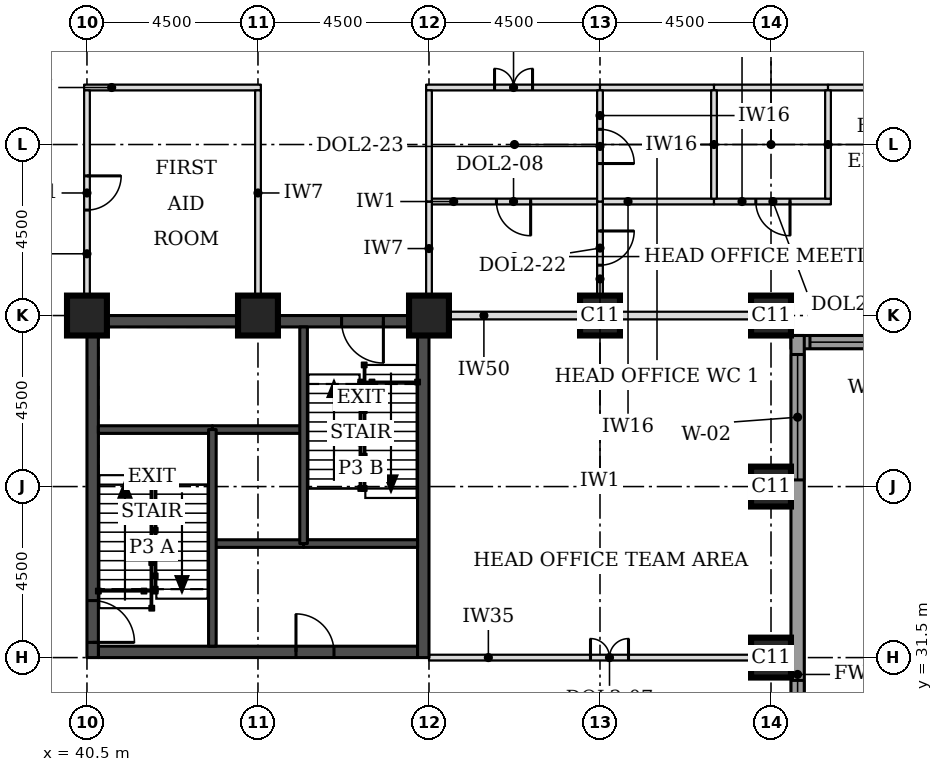
"""IFC4 building model, lengths in metres.
Left out: names, types, materials, properties, quantities, classifications, styles, units other than length and angle.
Written with IfcOpenShell. Run it as: python <this file> out.ifc"""

import sys

from ifc_helpers import new_model, si_unit, direction, frame, frame_2d, origin, origin_2d, place, context, subcontext, project, spatial, rectangle, extrude, element, fill, save


model = new_model("IFC4")
c1 = context("Model", 3, precision=1e-05, world=origin(), true_north=direction((0.0, 1.0)))
c2 = subcontext(c1, "Body", "Model", "MODEL_VIEW")
j1 = project(units=[si_unit("LENGTHUNIT", "METRE"), si_unit("PLANEANGLEUNIT", "RADIAN")], contexts=[c1])
p1 = place(None, origin())
s1 = spatial("IfcSite", under=j1, at=p1, CompositionType="ELEMENT")
p2 = place(p1, origin())
s2 = spatial("IfcBuilding", under=s1, at=p2, CompositionType="ELEMENT")
p3 = place(p2, frame((0.0, 0.0, 86.3)))
s3 = spatial("IfcBuildingStorey", under=s2, at=p3, CompositionType="ELEMENT", Elevation=86.3)
for number, where, z_axis, x_axis in (
    (1, (58.5, 31.5, 0.0), (0.0, 0.0, 1.0), (1.0, 0.0, 0.0)),
    (2, (58.5, 36.0, 0.0), (0.0, 0.0, 1.0), (1.0, 0.0, 0.0)),
    (3, (40.5, 40.5, 0.0), (0.0, 0.0, 1.0), (1.0, 0.0, 0.0)),
    (4, (45.0, 40.5, 0.0), (0.0, 0.0, 1.0), (1.0, 0.0, 0.0)),
    (5, (49.5, 40.5, 0.0), (0.0, 0.0, 1.0), (1.0, 0.0, 0.0)),
    (6, (54.0, 40.5, 0.0), (0.0, 0.0, 1.0), (1.0, 0.0, 0.0)),
    (7, (58.5, 40.5, 0.0), (0.0, 0.0, 1.0), (1.0, 0.0, 0.0)),
):
    element("IfcColumn", number, at=place(p3, frame(where, z_axis=z_axis, x_axis=x_axis)), inside=s3, PredefinedType="COLUMN", context=c2, shape_type="SweptSolid", body=[
        extrude(rectangle(XDim=1.05, YDim=1.05, at=origin_2d()), origin(), (0.0, 0.0, 1.0), 3.7),
    ])
p4 = place(p3, frame((40.8, 31.65, 0.0), z_axis=(0.0, 0.0, 1.0), x_axis=(1.0, 0.0, 0.0)))
e8 = element("IfcWall", 8, at=p4, inside=s3, PredefinedType="SHEAR", context=c2, shape_type="SweptSolid", body=[
    extrude(rectangle(XDim=8.4, YDim=0.3, at=frame_2d((4.2, 0.0))), origin(), (0.0, 0.0, 1.0), 3.7),
])
p5 = place(p4, frame((5.2, 0.0, 0.0)))
e9 = element("IfcOpeningElement", 9, at=p5, cuts=e8, PredefinedType="OPENING", context=c2, shape_type="SweptSolid", body=[
    extrude(rectangle(XDim=1.0, YDim=2.1, at=frame_2d((0.5, 1.05))), frame((0.0, 0.16, 0.0), z_axis=(0.0, -1.0, 0.0), x_axis=(1.0, 0.0, 0.0)), (0.0, 0.0, 1.0), 0.32),
])
p6 = place(p3, frame((40.8, 40.35, 0.0), z_axis=(0.0, 0.0, 1.0), x_axis=(1.0, 0.0, 0.0)))
e10 = element("IfcWall", 10, at=p6, inside=s3, PredefinedType="SHEAR", context=c2, shape_type="SweptSolid", body=[
    extrude(rectangle(XDim=8.4, YDim=0.3, at=frame_2d((4.2, 0.0))), origin(), (0.0, 0.0, 1.0), 3.7),
])
p7 = place(p6, frame((6.4, 0.0, 0.0)))
e11 = element("IfcOpeningElement", 11, at=p7, cuts=e10, PredefinedType="OPENING", context=c2, shape_type="SweptSolid", body=[
    extrude(rectangle(XDim=1.1, YDim=2.1, at=frame_2d((0.55, 1.05))), frame((0.0, 0.16, 0.0), z_axis=(0.0, -1.0, 0.0), x_axis=(1.0, 0.0, 0.0)), (0.0, 0.0, 1.0), 0.32),
])
p8 = place(p3, frame((40.65, 31.5, 0.0), z_axis=(0.0, 0.0, 1.0), x_axis=(0.0, 1.0, 0.0)))
e12 = element("IfcWall", 12, at=p8, inside=s3, PredefinedType="SHEAR", context=c2, shape_type="SweptSolid", body=[
    extrude(rectangle(XDim=9.0, YDim=0.3, at=frame_2d((4.5, 0.0))), origin(), (0.0, 0.0, 1.0), 3.7),
])
p9 = place(p8, frame((0.4, 0.0, 0.0)))
e13 = element("IfcOpeningElement", 13, at=p9, cuts=e12, PredefinedType="OPENING", context=c2, shape_type="SweptSolid", body=[
    extrude(rectangle(XDim=1.1, YDim=2.1, at=frame_2d((0.55, 1.05))), frame((0.0, 0.16, 0.0), z_axis=(0.0, -1.0, 0.0), x_axis=(1.0, 0.0, 0.0)), (0.0, 0.0, 1.0), 0.32),
])
p10 = place(p3, frame((49.35, 31.5, 0.0), z_axis=(0.0, 0.0, 1.0), x_axis=(0.0, 1.0, 0.0)))
e14 = element("IfcWall", 14, at=p10, inside=s3, PredefinedType="SHEAR", context=c2, shape_type="SweptSolid", body=[
    extrude(rectangle(XDim=9.0, YDim=0.3, at=frame_2d((4.5, 0.0))), origin(), (0.0, 0.0, 1.0), 3.7),
])
p11 = place(p3, frame((59.025, 39.8, 0.0), z_axis=(0.0, 0.0, 1.0), x_axis=(1.0, 0.0, 0.0)))
e15 = element("IfcWall", 15, at=p11, inside=s3, PredefinedType="STANDARD", context=c2, shape_type="SweptSolid", body=[
    extrude(rectangle(XDim=13.337, YDim=0.35, at=frame_2d((6.669, 0.0))), origin(), (0.0, 0.0, 1.0), 3.525),
])
p12 = place(p11, frame((0.5, 0.0, 0.9)))
e16 = element("IfcOpeningElement", 16, at=p12, cuts=e15, PredefinedType="OPENING", context=c2, shape_type="SweptSolid", body=[
    extrude(rectangle(XDim=3.3, YDim=1.9, at=frame_2d((1.65, 0.95))), frame((0.0, 0.185, 0.0), z_axis=(0.0, -1.0, 0.0), x_axis=(1.0, 0.0, 0.0)), (0.0, 0.0, 1.0), 0.37),
])
p13 = place(p3, frame((59.2, 22.138, 0.0), z_axis=(0.0, 0.0, 1.0), x_axis=(0.0, 1.0, 0.0)))
e17 = element("IfcWall", 17, at=p13, inside=s3, PredefinedType="STANDARD", context=c2, shape_type="SweptSolid", body=[
    extrude(rectangle(XDim=17.837, YDim=0.35, at=frame_2d((8.919, 0.0))), origin(), (0.0, 0.0, 1.0), 3.525),
])
p14 = place(p13, frame((5.462, 0.0, 0.9)))
e18 = element("IfcOpeningElement", 18, at=p14, cuts=e17, PredefinedType="OPENING", context=c2, shape_type="SweptSolid", body=[
    extrude(rectangle(XDim=3.3, YDim=1.9, at=frame_2d((1.65, 0.95))), frame((0.0, 0.185, 0.0), z_axis=(0.0, -1.0, 0.0), x_axis=(1.0, 0.0, 0.0)), (0.0, 0.0, 1.0), 0.37),
])
p15 = place(p13, frame((14.037, 0.0, 0.9)))
e19 = element("IfcOpeningElement", 19, at=p15, cuts=e17, PredefinedType="OPENING", context=c2, shape_type="SweptSolid", body=[
    extrude(rectangle(XDim=3.3, YDim=1.9, at=frame_2d((1.65, 0.95))), frame((0.0, 0.185, 0.0), z_axis=(0.0, -1.0, 0.0), x_axis=(1.0, 0.0, 0.0)), (0.0, 0.0, 1.0), 0.37),
])
p16 = place(p3, frame((49.5, 31.5, 0.0), z_axis=(0.0, 0.0, 1.0), x_axis=(1.0, 0.0, 0.0)))
e20 = element("IfcWall", 20, at=p16, inside=s3, PredefinedType="PARTITIONING", context=c2, shape_type="SweptSolid", body=[
    extrude(rectangle(XDim=9.525, YDim=0.15, at=frame_2d((4.762, 0.0))), origin(), (0.0, 0.0, 1.0), 2.55),
])
p17 = place(p16, frame((4.25, 0.0, 0.0)))
e21 = element("IfcOpeningElement", 21, at=p17, cuts=e20, PredefinedType="OPENING", context=c2, shape_type="SweptSolid", body=[
    extrude(rectangle(XDim=1.0, YDim=2.1, at=frame_2d((0.5, 1.05))), frame((0.0, 0.085, 0.0), z_axis=(0.0, -1.0, 0.0), x_axis=(1.0, 0.0, 0.0)), (0.0, 0.0, 1.0), 0.17),
])
p18 = place(p3, frame((50.015, 40.5, 0.0), z_axis=(0.0, 0.0, 1.0), x_axis=(1.0, 0.0, 0.0)))
e22 = element("IfcWall", 22, at=p18, inside=s3, PredefinedType="PARTITIONING", context=c2, shape_type="SweptSolid", body=[
    extrude(rectangle(XDim=3.46, YDim=0.2, at=frame_2d((1.73, 0.0))), origin(), (0.0, 0.0, 1.0), 2.8),
])
p19 = place(p3, frame((54.495, 40.5, 0.0), z_axis=(0.0, 0.0, 1.0), x_axis=(1.0, 0.0, 0.0)))
e23 = element("IfcWall", 23, at=p19, inside=s3, PredefinedType="PARTITIONING", context=c2, shape_type="SweptSolid", body=[
    extrude(rectangle(XDim=3.48, YDim=0.2, at=frame_2d((1.74, 0.0))), origin(), (0.0, 0.0, 1.0), 2.8),
])
p20 = place(p3, frame((49.575, 43.5, 0.0), z_axis=(0.0, 0.0, 1.0), x_axis=(1.0, 0.0, 0.0)))
e24 = element("IfcWall", 24, at=p20, inside=s3, PredefinedType="PARTITIONING", context=c2, shape_type="SweptSolid", body=[
    extrude(rectangle(XDim=4.35, YDim=0.15, at=frame_2d((2.175, 0.0))), origin(), (0.0, 0.0, 1.0), 3.55),
])
p21 = place(p20, frame((1.7, 0.0, 0.0)))
e25 = element("IfcOpeningElement", 25, at=p21, cuts=e24, PredefinedType="OPENING", context=c2, shape_type="SweptSolid", body=[
    extrude(rectangle(XDim=0.9, YDim=2.1, at=frame_2d((0.45, 1.05))), frame((0.0, 0.085, 0.0), z_axis=(0.0, -1.0, 0.0), x_axis=(1.0, 0.0, 0.0)), (0.0, 0.0, 1.0), 0.17),
])
p22 = place(p3, frame((54.075, 43.5, 0.0), z_axis=(0.0, 0.0, 1.0), x_axis=(1.0, 0.0, 0.0)))
e26 = element("IfcWall", 26, at=p22, inside=s3, PredefinedType="PARTITIONING", context=c2, shape_type="SweptSolid", body=[
    extrude(rectangle(XDim=2.925, YDim=0.15, at=frame_2d((1.462, 0.0))), origin(), (0.0, 0.0, 1.0), 3.55),
])
p23 = place(p3, frame((57.0, 43.5, 0.0), z_axis=(0.0, 0.0, 1.0), x_axis=(1.0, 0.0, 0.0)))
e27 = element("IfcWall", 27, at=p23, inside=s3, PredefinedType="PARTITIONING", context=c2, shape_type="SweptSolid", body=[
    extrude(rectangle(XDim=3.075, YDim=0.15, at=frame_2d((1.538, 0.0))), origin(), (0.0, 0.0, 1.0), 3.55),
])
p24 = place(p23, frame((1.1, 0.0, 0.0)))
e28 = element("IfcOpeningElement", 28, at=p24, cuts=e27, PredefinedType="OPENING", context=c2, shape_type="SweptSolid", body=[
    extrude(rectangle(XDim=0.9, YDim=2.1, at=frame_2d((0.45, 1.05))), frame((0.0, 0.085, 0.0), z_axis=(0.0, -1.0, 0.0), x_axis=(1.0, 0.0, 0.0)), (0.0, 0.0, 1.0), 0.17),
])
p25 = place(p3, frame((40.425, 46.5, 0.0), z_axis=(0.0, 0.0, 1.0), x_axis=(1.0, 0.0, 0.0)))
e29 = element("IfcWall", 29, at=p25, inside=s3, PredefinedType="PARTITIONING", context=c2, shape_type="SweptSolid", body=[
    extrude(rectangle(XDim=4.65, YDim=0.15, at=frame_2d((2.325, 0.0))), origin(), (0.0, 0.0, 1.0), 3.55),
])
p26 = place(p3, frame((49.425, 46.5, 0.0), z_axis=(0.0, 0.0, 1.0), x_axis=(1.0, 0.0, 0.0)))
e30 = element("IfcWall", 30, at=p26, inside=s3, PredefinedType="PARTITIONING", context=c2, shape_type="SweptSolid", body=[
    extrude(rectangle(XDim=4.575, YDim=0.15, at=frame_2d((2.288, 0.0))), origin(), (0.0, 0.0, 1.0), 3.55),
])
p27 = place(p26, frame((1.8, 0.0, 0.0)))
e31 = element("IfcOpeningElement", 31, at=p27, cuts=e30, PredefinedType="OPENING", context=c2, shape_type="SweptSolid", body=[
    extrude(rectangle(XDim=1.0, YDim=2.1, at=frame_2d((0.5, 1.05))), frame((0.0, 0.085, 0.0), z_axis=(0.0, -1.0, 0.0), x_axis=(1.0, 0.0, 0.0)), (0.0, 0.0, 1.0), 0.17),
])
for number, where, z_axis, x_axis in (
    (32, (54.0, 46.5, 0.0), (0.0, 0.0, 1.0), (1.0, 0.0, 0.0)),
    (33, (57.0, 46.5, 0.0), (0.0, 0.0, 1.0), (1.0, 0.0, 0.0)),
):
    element("IfcWall", number, at=place(p3, frame(where, z_axis=z_axis, x_axis=x_axis)), inside=s3, PredefinedType="PARTITIONING", context=c2, shape_type="SweptSolid", body=[
        extrude(rectangle(XDim=3.0, YDim=0.15, at=frame_2d((1.5, 0.0))), origin(), (0.0, 0.0, 1.0), 3.55),
    ])
p28 = place(p3, frame((60.0, 46.5, 0.0), z_axis=(0.0, 0.0, 1.0), x_axis=(1.0, 0.0, 0.0)))
e34 = element("IfcWall", 34, at=p28, inside=s3, PredefinedType="PARTITIONING", context=c2, shape_type="SweptSolid", body=[
    extrude(rectangle(XDim=10.5, YDim=0.15, at=frame_2d((5.25, 0.0))), origin(), (0.0, 0.0, 1.0), 3.55),
])
p29 = place(p3, frame((40.5, 41.025, 0.0), z_axis=(0.0, 0.0, 1.0), x_axis=(0.0, 1.0, 0.0)))
e35 = element("IfcWall", 35, at=p29, inside=s3, PredefinedType="PARTITIONING", context=c2, shape_type="SweptSolid", body=[
    extrude(rectangle(XDim=5.4, YDim=0.15, at=frame_2d((2.7, 0.0))), origin(), (0.0, 0.0, 1.0), 3.55),
])
p30 = place(p29, frame((2.25, 0.0, 0.0)))
e36 = element("IfcOpeningElement", 36, at=p30, cuts=e35, PredefinedType="OPENING", context=c2, shape_type="SweptSolid", body=[
    extrude(rectangle(XDim=0.9, YDim=2.1, at=frame_2d((0.45, 1.05))), frame((0.0, 0.085, 0.0), z_axis=(0.0, -1.0, 0.0), x_axis=(1.0, 0.0, 0.0)), (0.0, 0.0, 1.0), 0.17),
])
p31 = place(p3, frame((45.0, 41.025, 0.0), z_axis=(0.0, 0.0, 1.0), x_axis=(0.0, 1.0, 0.0)))
e37 = element("IfcWall", 37, at=p31, inside=s3, PredefinedType="PARTITIONING", context=c2, shape_type="SweptSolid", body=[
    extrude(rectangle(XDim=5.4, YDim=0.15, at=frame_2d((2.7, 0.0))), origin(), (0.0, 0.0, 1.0), 3.55),
])
p32 = place(p3, frame((49.5, 41.025, 0.0), z_axis=(0.0, 0.0, 1.0), x_axis=(0.0, 1.0, 0.0)))
e38 = element("IfcWall", 38, at=p32, inside=s3, PredefinedType="PARTITIONING", context=c2, shape_type="SweptSolid", body=[
    extrude(rectangle(XDim=2.475, YDim=0.15, at=frame_2d((1.238, 0.0))), origin(), (0.0, 0.0, 1.0), 3.55),
])
p33 = place(p3, frame((54.0, 41.025, 0.0), z_axis=(0.0, 0.0, 1.0), x_axis=(0.0, 1.0, 0.0)))
e39 = element("IfcWall", 39, at=p33, inside=s3, PredefinedType="PARTITIONING", context=c2, shape_type="SweptSolid", body=[
    extrude(rectangle(XDim=2.475, YDim=0.15, at=frame_2d((1.238, 0.0))), origin(), (0.0, 0.0, 1.0), 3.55),
])
p34 = place(p33, frame((0.8, 0.0, 0.0)))
e40 = element("IfcOpeningElement", 40, at=p34, cuts=e39, PredefinedType="OPENING", context=c2, shape_type="SweptSolid", body=[
    extrude(rectangle(XDim=0.9, YDim=2.1, at=frame_2d((0.45, 1.05))), frame((0.0, 0.085, 0.0), z_axis=(0.0, -1.0, 0.0), x_axis=(1.0, 0.0, 0.0)), (0.0, 0.0, 1.0), 0.17),
])
p35 = place(p3, frame((49.5, 43.5, 0.0), z_axis=(0.0, 0.0, 1.0), x_axis=(0.0, 1.0, 0.0)))
e41 = element("IfcWall", 41, at=p35, inside=s3, PredefinedType="PARTITIONING", context=c2, shape_type="SweptSolid", body=[
    extrude(rectangle(XDim=2.925, YDim=0.15, at=frame_2d((1.462, 0.0))), origin(), (0.0, 0.0, 1.0), 3.55),
])
p36 = place(p3, frame((54.0, 43.5, 0.0), z_axis=(0.0, 0.0, 1.0), x_axis=(0.0, 1.0, 0.0)))
e42 = element("IfcWall", 42, at=p36, inside=s3, PredefinedType="PARTITIONING", context=c2, shape_type="SweptSolid", body=[
    extrude(rectangle(XDim=2.925, YDim=0.15, at=frame_2d((1.462, 0.0))), origin(), (0.0, 0.0, 1.0), 3.55),
])
p37 = place(p36, frame((1.0, 0.0, 0.0)))
e43 = element("IfcOpeningElement", 43, at=p37, cuts=e42, PredefinedType="OPENING", context=c2, shape_type="SweptSolid", body=[
    extrude(rectangle(XDim=0.9, YDim=2.1, at=frame_2d((0.45, 1.05))), frame((0.0, 0.085, 0.0), z_axis=(0.0, -1.0, 0.0), x_axis=(1.0, 0.0, 0.0)), (0.0, 0.0, 1.0), 0.17),
])
for number, where, z_axis, x_axis in (
    (44, (57.0, 43.575, 0.0), (0.0, 0.0, 1.0), (0.0, 1.0, 0.0)),
    (45, (60.0, 43.575, 0.0), (0.0, 0.0, 1.0), (0.0, 1.0, 0.0)),
):
    element("IfcWall", number, at=place(p3, frame(where, z_axis=z_axis, x_axis=x_axis)), inside=s3, PredefinedType="PARTITIONING", context=c2, shape_type="SweptSolid", body=[
        extrude(rectangle(XDim=2.85, YDim=0.15, at=frame_2d((1.425, 0.0))), origin(), (0.0, 0.0, 1.0), 3.55),
    ])
p38 = place(p3, frame((43.8, 34.5, 0.0), z_axis=(0.0, 0.0, 1.0), x_axis=(1.0, 0.0, 0.0)))
e46 = element("IfcWall", 46, at=p38, inside=s3, PredefinedType="SOLIDWALL", context=c2, shape_type="SweptSolid", body=[
    extrude(rectangle(XDim=2.4, YDim=0.2, at=frame_2d((1.2, 0.0))), origin(), (0.0, 0.0, 1.0), 3.55),
])
p39 = place(p3, frame((46.2, 34.5, 0.0), z_axis=(0.0, 0.0, 1.0), x_axis=(1.0, 0.0, 0.0)))
e47 = element("IfcWall", 47, at=p39, inside=s3, PredefinedType="SOLIDWALL", context=c2, shape_type="SweptSolid", body=[
    extrude(rectangle(XDim=3.0, YDim=0.2, at=frame_2d((1.5, 0.0))), origin(), (0.0, 0.0, 1.0), 3.55),
])
p40 = place(p3, frame((43.8, 37.5, 0.0), z_axis=(0.0, 0.0, 1.0), x_axis=(1.0, 0.0, 0.0)))
e48 = element("IfcWall", 48, at=p40, inside=s3, PredefinedType="SOLIDWALL", context=c2, shape_type="SweptSolid", body=[
    extrude(rectangle(XDim=2.4, YDim=0.2, at=frame_2d((1.2, 0.0))), origin(), (0.0, 0.0, 1.0), 3.7),
])
p41 = place(p3, frame((40.8, 37.5, 0.0), z_axis=(0.0, 0.0, 1.0), x_axis=(1.0, 0.0, 0.0)))
e49 = element("IfcWall", 49, at=p41, inside=s3, PredefinedType="SOLIDWALL", context=c2, shape_type="SweptSolid", body=[
    extrude(rectangle(XDim=3.0, YDim=0.2, at=frame_2d((1.5, 0.0))), origin(), (0.0, 0.0, 1.0), 3.55),
])
for number, where, z_axis, x_axis in (
    (50, (43.8, 31.8, 0.0), (0.0, 0.0, 1.0), (0.0, 1.0, 0.0)),
    (51, (46.2, 34.5, 0.0), (0.0, 0.0, 1.0), (0.0, 1.0, 0.0)),
):
    element("IfcWall", number, at=place(p3, frame(where, z_axis=z_axis, x_axis=x_axis)), inside=s3, PredefinedType="SOLIDWALL", context=c2, shape_type="SweptSolid", body=[
        extrude(rectangle(XDim=5.7, YDim=0.2, at=frame_2d((2.85, 0.0))), origin(), (0.0, 0.0, 1.0), 3.55),
    ])
p42 = place(p12, origin())
e52 = element("IfcWindow", 52, at=p42, inside=s3, PartitioningType="SINGLE_PANEL", PredefinedType="WINDOW", context=c2, shape_type="SweptSolid", body=[
    extrude(rectangle(XDim=3.3, YDim=1.9, at=frame_2d((1.65, 0.95))), frame((0.0, 0.085, 0.0), z_axis=(0.0, -1.0, 0.0), x_axis=(1.0, 0.0, 0.0)), (0.0, 0.0, 1.0), 0.06),
])
fill(e16, e52)
p43 = place(p14, origin())
e53 = element("IfcWindow", 53, at=p43, inside=s3, PartitioningType="SINGLE_PANEL", PredefinedType="WINDOW", context=c2, shape_type="SweptSolid", body=[
    extrude(rectangle(XDim=3.3, YDim=1.9, at=frame_2d((1.65, 0.95))), frame((0.0, 0.085, 0.0), z_axis=(0.0, -1.0, 0.0), x_axis=(1.0, 0.0, 0.0)), (0.0, 0.0, 1.0), 0.06),
])
fill(e18, e53)
p44 = place(p15, origin())
e54 = element("IfcWindow", 54, at=p44, inside=s3, PartitioningType="SINGLE_PANEL", PredefinedType="WINDOW", context=c2, shape_type="SweptSolid", body=[
    extrude(rectangle(XDim=3.3, YDim=1.9, at=frame_2d((1.65, 0.95))), frame((0.0, 0.085, 0.0), z_axis=(0.0, -1.0, 0.0), x_axis=(1.0, 0.0, 0.0)), (0.0, 0.0, 1.0), 0.06),
])
fill(e19, e54)
p45 = place(p30, frame((0.9, 0.0, 0.0), z_axis=(0.0, 0.0, 1.0), x_axis=(-1.0, 0.0, 0.0)))
e55 = element("IfcDoor", 55, at=p45, inside=s3, OperationType="SINGLE_SWING_LEFT", PredefinedType="DOOR", context=c2, shape_type="SweptSolid", body=[
    extrude(rectangle(XDim=0.9, YDim=2.1, at=frame_2d((0.45, 1.05))), frame((0.0, 0.025, 0.0), z_axis=(0.0, -1.0, 0.0), x_axis=(1.0, 0.0, 0.0)), (0.0, 0.0, 1.0), 0.05),
])
fill(e36, e55)
p46 = place(p17, origin())
e56 = element("IfcDoor", 56, at=p46, inside=s3, OperationType="DOUBLE_DOOR_SINGLE_SWING", PredefinedType="DOOR", context=c2, shape_type="SweptSolid", body=[
    extrude(rectangle(XDim=1.0, YDim=2.1, at=frame_2d((0.5, 1.05))), frame((0.0, 0.025, 0.0), z_axis=(0.0, -1.0, 0.0), x_axis=(1.0, 0.0, 0.0)), (0.0, 0.0, 1.0), 0.05),
])
fill(e21, e56)
p47 = place(p27, origin())
e57 = element("IfcDoor", 57, at=p47, inside=s3, OperationType="DOUBLE_DOOR_SINGLE_SWING", PredefinedType="DOOR", context=c2, shape_type="SweptSolid", body=[
    extrude(rectangle(XDim=1.0, YDim=2.1, at=frame_2d((0.5, 1.05))), frame((0.0, 0.025, 0.0), z_axis=(0.0, -1.0, 0.0), x_axis=(1.0, 0.0, 0.0)), (0.0, 0.0, 1.0), 0.05),
])
fill(e31, e57)
p48 = place(p21, frame((0.9, 0.0, 0.0), z_axis=(0.0, 0.0, 1.0), x_axis=(-1.0, 0.0, 0.0)))
e58 = element("IfcDoor", 58, at=p48, inside=s3, OperationType="SINGLE_SWING_LEFT", PredefinedType="DOOR", context=c2, shape_type="SweptSolid", body=[
    extrude(rectangle(XDim=0.9, YDim=2.1, at=frame_2d((0.45, 1.05))), frame((0.0, 0.025, 0.0), z_axis=(0.0, -1.0, 0.0), x_axis=(1.0, 0.0, 0.0)), (0.0, 0.0, 1.0), 0.05),
])
fill(e25, e58)
p49 = place(p37, frame((0.9, 0.0, 0.0), z_axis=(0.0, 0.0, 1.0), x_axis=(-1.0, 0.0, 0.0)))
e59 = element("IfcDoor", 59, at=p49, inside=s3, OperationType="SINGLE_SWING_RIGHT", PredefinedType="DOOR", context=c2, shape_type="SweptSolid", body=[
    extrude(rectangle(XDim=0.9, YDim=2.1, at=frame_2d((0.45, 1.05))), frame((0.0, 0.025, 0.0), z_axis=(0.0, -1.0, 0.0), x_axis=(1.0, 0.0, 0.0)), (0.0, 0.0, 1.0), 0.05),
])
fill(e43, e59)
p50 = place(p34, frame((0.9, 0.0, 0.0), z_axis=(0.0, 0.0, 1.0), x_axis=(-1.0, 0.0, 0.0)))
e60 = element("IfcDoor", 60, at=p50, inside=s3, OperationType="SINGLE_SWING_LEFT", PredefinedType="DOOR", context=c2, shape_type="SweptSolid", body=[
    extrude(rectangle(XDim=0.9, YDim=2.1, at=frame_2d((0.45, 1.05))), frame((0.0, 0.025, 0.0), z_axis=(0.0, -1.0, 0.0), x_axis=(1.0, 0.0, 0.0)), (0.0, 0.0, 1.0), 0.05),
])
fill(e40, e60)
p51 = place(p24, frame((0.9, 0.0, 0.0), z_axis=(0.0, 0.0, 1.0), x_axis=(-1.0, 0.0, 0.0)))
e61 = element("IfcDoor", 61, at=p51, inside=s3, OperationType="SINGLE_SWING_LEFT", PredefinedType="DOOR", context=c2, shape_type="SweptSolid", body=[
    extrude(rectangle(XDim=0.9, YDim=2.1, at=frame_2d((0.45, 1.05))), frame((0.0, 0.025, 0.0), z_axis=(0.0, -1.0, 0.0), x_axis=(1.0, 0.0, 0.0)), (0.0, 0.0, 1.0), 0.05),
])
fill(e28, e61)
p52 = place(p9, frame((1.1, 0.0, 0.0), z_axis=(0.0, 0.0, 1.0), x_axis=(-1.0, 0.0, 0.0)))
e62 = element("IfcDoor", 62, at=p52, inside=s3, OperationType="SINGLE_SWING_RIGHT", PredefinedType="DOOR", context=c2, shape_type="SweptSolid", body=[
    extrude(rectangle(XDim=1.1, YDim=2.1, at=frame_2d((0.55, 1.05))), frame((0.0, 0.025, 0.0), z_axis=(0.0, -1.0, 0.0), x_axis=(1.0, 0.0, 0.0)), (0.0, 0.0, 1.0), 0.05),
])
fill(e13, e62)
p53 = place(p7, frame((1.1, 0.0, 0.0), z_axis=(0.0, 0.0, 1.0), x_axis=(-1.0, 0.0, 0.0)))
e63 = element("IfcDoor", 63, at=p53, inside=s3, OperationType="SINGLE_SWING_LEFT", PredefinedType="DOOR", context=c2, shape_type="SweptSolid", body=[
    extrude(rectangle(XDim=1.1, YDim=2.1, at=frame_2d((0.55, 1.05))), frame((0.0, 0.025, 0.0), z_axis=(0.0, -1.0, 0.0), x_axis=(1.0, 0.0, 0.0)), (0.0, 0.0, 1.0), 0.05),
])
fill(e11, e63)
p54 = place(p5, origin())
e64 = element("IfcDoor", 64, at=p54, inside=s3, OperationType="SINGLE_SWING_LEFT", PredefinedType="DOOR", context=c2, shape_type="SweptSolid", body=[
    extrude(rectangle(XDim=1.0, YDim=2.1, at=frame_2d((0.5, 1.05))), frame((0.0, 0.025, 0.0), z_axis=(0.0, -1.0, 0.0), x_axis=(1.0, 0.0, 0.0)), (0.0, 0.0, 1.0), 0.05),
])
fill(e9, e64)
save(model, sys.argv[1])
